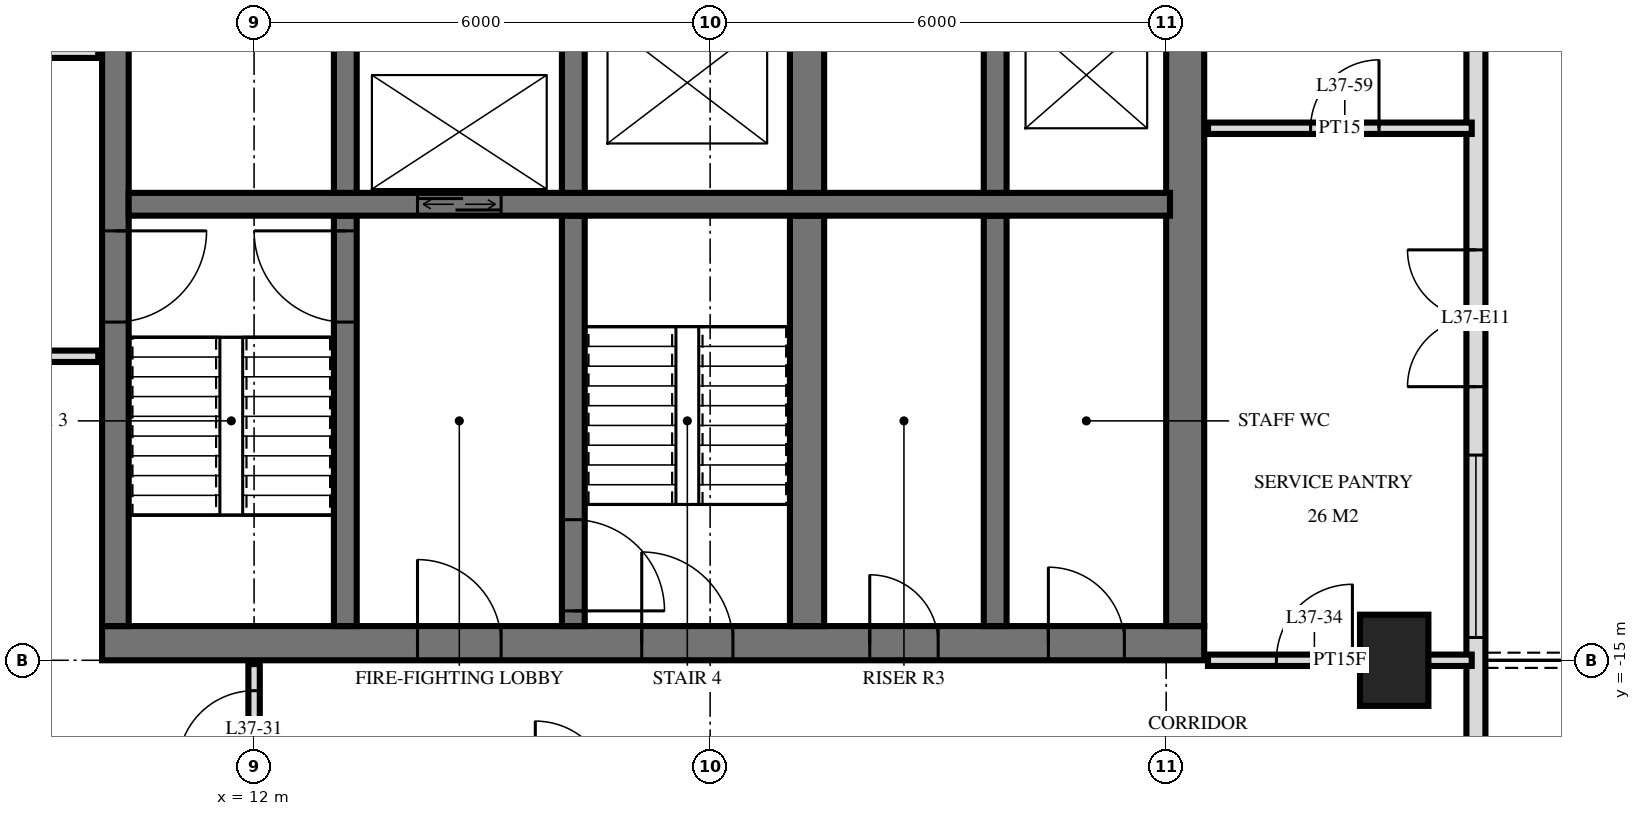
"""IFC4 building model, lengths in metres.
Left out: names, types, materials, properties, quantities, classifications, styles, units other than length and angle.
Written with IfcOpenShell. Run it as: python <this file> out.ifc"""

import sys

from ifc_helpers import new_model, si_unit, direction, frame, frame_2d, origin, origin_2d, place, context, subcontext, project, spatial, rectangle, extrude, element, fill, save


model = new_model("IFC4")
c1 = context("Model", 3, precision=1e-05, world=origin(), true_north=direction((0.0, 1.0)))
c2 = subcontext(c1, "Body", "Model", "MODEL_VIEW")
j1 = project(units=[si_unit("LENGTHUNIT", "METRE"), si_unit("PLANEANGLEUNIT", "RADIAN")], contexts=[c1])
p1 = place(None, origin())
s1 = spatial("IfcSite", under=j1, at=p1, CompositionType="ELEMENT")
p2 = place(p1, origin())
s2 = spatial("IfcBuilding", under=s1, at=p2, CompositionType="ELEMENT")
p3 = place(p2, frame((0.0, 0.0, 145.2)))
s3 = spatial("IfcBuildingStorey", under=s2, at=p3, CompositionType="ELEMENT", Elevation=145.2)
p4 = place(p3, frame((27.0, -15.0, 0.0), z_axis=(0.0, 0.0, 1.0), x_axis=(0.0, 1.0, 0.0)))
e1 = element("IfcColumn", 1, at=p4, inside=s3, PredefinedType="COLUMN", context=c2, shape_type="SweptSolid", body=[
    extrude(rectangle(XDim=1.2, YDim=0.9, at=origin_2d()), origin(), (0.0, 0.0, 1.0), 3.6),
])
p5 = place(p3, frame((10.0, -14.775, 0.0), z_axis=(0.0, 0.0, 1.0), x_axis=(1.0, 0.0, 0.0)))
e2 = element("IfcWall", 2, at=p5, inside=s3, PredefinedType="SHEAR", context=c2, shape_type="SweptSolid", body=[
    extrude(rectangle(XDim=14.5, YDim=0.45, at=frame_2d((7.25, 0.0))), origin(), (0.0, 0.0, 1.0), 3.6),
])
p6 = place(p5, frame((7.1, 0.0, 0.0)))
e3 = element("IfcOpeningElement", 3, at=p6, cuts=e2, PredefinedType="OPENING", context=c2, shape_type="SweptSolid", body=[
    extrude(rectangle(XDim=1.2, YDim=2.1, at=frame_2d((0.6, 1.05))), frame((0.0, 0.235, 0.0), z_axis=(0.0, -1.0, 0.0), x_axis=(1.0, 0.0, 0.0)), (0.0, 0.0, 1.0), 0.47),
])
p7 = place(p5, frame((4.15, 0.0, 0.0)))
e4 = element("IfcOpeningElement", 4, at=p7, cuts=e2, PredefinedType="OPENING", context=c2, shape_type="SweptSolid", body=[
    extrude(rectangle(XDim=1.1, YDim=2.1, at=frame_2d((0.55, 1.05))), frame((0.0, 0.235, 0.0), z_axis=(0.0, -1.0, 0.0), x_axis=(1.0, 0.0, 0.0)), (0.0, 0.0, 1.0), 0.47),
])
p8 = place(p5, frame((10.1, 0.0, 0.0)))
e5 = element("IfcOpeningElement", 5, at=p8, cuts=e2, PredefinedType="OPENING", context=c2, shape_type="SweptSolid", body=[
    extrude(rectangle(XDim=0.9, YDim=2.1, at=frame_2d((0.45, 1.05))), frame((0.0, 0.235, 0.0), z_axis=(0.0, -1.0, 0.0), x_axis=(1.0, 0.0, 0.0)), (0.0, 0.0, 1.0), 0.47),
])
p9 = place(p5, frame((12.45, 0.0, 0.0)))
e6 = element("IfcOpeningElement", 6, at=p9, cuts=e2, PredefinedType="OPENING", context=c2, shape_type="SweptSolid", body=[
    extrude(rectangle(XDim=1.0, YDim=2.1, at=frame_2d((0.5, 1.05))), frame((0.0, 0.235, 0.0), z_axis=(0.0, -1.0, 0.0), x_axis=(1.0, 0.0, 0.0)), (0.0, 0.0, 1.0), 0.47),
])
p10 = place(p3, frame((10.175, -14.55, 0.0), z_axis=(0.0, 0.0, 1.0), x_axis=(0.0, 1.0, 0.0)))
e7 = element("IfcWall", 7, at=p10, inside=s3, PredefinedType="SHEAR", context=c2, shape_type="SweptSolid", body=[
    extrude(rectangle(XDim=14.1, YDim=0.35, at=frame_2d((7.05, 0.0))), origin(), (0.0, 0.0, 1.0), 3.6),
])
p11 = place(p10, frame((8.4, 0.0, 0.0)))
e8 = element("IfcOpeningElement", 8, at=p11, cuts=e7, PredefinedType="OPENING", context=c2, shape_type="SweptSolid", body=[
    extrude(rectangle(XDim=1.4, YDim=2.4, at=frame_2d((0.7, 1.2))), frame((0.0, 0.185, 0.0), z_axis=(0.0, -1.0, 0.0), x_axis=(1.0, 0.0, 0.0)), (0.0, 0.0, 1.0), 0.37),
])
p12 = place(p10, frame((10.0, 0.0, 0.0)))
e9 = element("IfcOpeningElement", 9, at=p12, cuts=e7, PredefinedType="OPENING", context=c2, shape_type="SweptSolid", body=[
    extrude(rectangle(XDim=1.4, YDim=2.4, at=frame_2d((0.7, 1.2))), frame((0.0, 0.185, 0.0), z_axis=(0.0, -1.0, 0.0), x_axis=(1.0, 0.0, 0.0)), (0.0, 0.0, 1.0), 0.37),
])
p13 = place(p10, frame((4.0, 0.0, 0.0)))
e10 = element("IfcOpeningElement", 10, at=p13, cuts=e7, PredefinedType="OPENING", context=c2, shape_type="SweptSolid", body=[
    extrude(rectangle(XDim=1.2, YDim=2.1, at=frame_2d((0.6, 1.05))), frame((0.0, 0.185, 0.0), z_axis=(0.0, -1.0, 0.0), x_axis=(1.0, 0.0, 0.0)), (0.0, 0.0, 1.0), 0.37),
])
p14 = place(p3, frame((24.25, -14.55, 0.0), z_axis=(0.0, 0.0, 1.0), x_axis=(0.0, 1.0, 0.0)))
e11 = element("IfcWall", 11, at=p14, inside=s3, PredefinedType="SHEAR", context=c2, shape_type="SweptSolid", body=[
    extrude(rectangle(XDim=14.1, YDim=0.5, at=frame_2d((7.05, 0.0))), origin(), (0.0, 0.0, 1.0), 3.6),
])
p15 = place(p3, frame((10.35, -9.0, 0.0), z_axis=(0.0, 0.0, 1.0), x_axis=(1.0, 0.0, 0.0)))
e12 = element("IfcWall", 12, at=p15, inside=s3, PredefinedType="SHEAR", context=c2, shape_type="SweptSolid", body=[
    extrude(rectangle(XDim=13.7, YDim=0.3, at=frame_2d((6.85, 0.0))), origin(), (0.0, 0.0, 1.0), 3.6),
])
p16 = place(p15, frame((3.8, 0.0, 0.0)))
e13 = element("IfcOpeningElement", 13, at=p16, cuts=e12, PredefinedType="OPENING", context=c2, shape_type="SweptSolid", body=[
    extrude(rectangle(XDim=1.1, YDim=2.1, at=frame_2d((0.55, 1.05))), frame((0.0, 0.16, 0.0), z_axis=(0.0, -1.0, 0.0), x_axis=(1.0, 0.0, 0.0)), (0.0, 0.0, 1.0), 0.32),
])
p17 = place(p3, frame((13.2, -8.85, 0.0), z_axis=(0.0, 0.0, 1.0), x_axis=(0.0, 1.0, 0.0)))
e14 = element("IfcWall", 14, at=p17, inside=s3, PredefinedType="SHEAR", context=c2, shape_type="SweptSolid", body=[
    extrude(rectangle(XDim=2.3, YDim=0.3, at=frame_2d((1.15, 0.0))), origin(), (0.0, 0.0, 1.0), 3.6),
])
p18 = place(p3, frame((13.2, -14.55, 0.0), z_axis=(0.0, 0.0, 1.0), x_axis=(0.0, 1.0, 0.0)))
e15 = element("IfcWall", 15, at=p18, inside=s3, PredefinedType="SHEAR", context=c2, shape_type="SweptSolid", body=[
    extrude(rectangle(XDim=5.4, YDim=0.3, at=frame_2d((2.7, 0.0))), origin(), (0.0, 0.0, 1.0), 3.6),
])
p19 = place(p18, frame((4.0, 0.0, 0.0)))
e16 = element("IfcOpeningElement", 16, at=p19, cuts=e15, PredefinedType="OPENING", context=c2, shape_type="SweptSolid", body=[
    extrude(rectangle(XDim=1.2, YDim=2.1, at=frame_2d((0.6, 1.05))), frame((0.0, 0.16, 0.0), z_axis=(0.0, -1.0, 0.0), x_axis=(1.0, 0.0, 0.0)), (0.0, 0.0, 1.0), 0.32),
])
p20 = place(p3, frame((16.2, -8.85, 0.0), z_axis=(0.0, 0.0, 1.0), x_axis=(0.0, 1.0, 0.0)))
e17 = element("IfcWall", 17, at=p20, inside=s3, PredefinedType="SHEAR", context=c2, shape_type="SweptSolid", body=[
    extrude(rectangle(XDim=2.3, YDim=0.3, at=frame_2d((1.15, 0.0))), origin(), (0.0, 0.0, 1.0), 3.6),
])
p21 = place(p3, frame((16.2, -14.55, 0.0), z_axis=(0.0, 0.0, 1.0), x_axis=(0.0, 1.0, 0.0)))
e18 = element("IfcWall", 18, at=p21, inside=s3, PredefinedType="SHEAR", context=c2, shape_type="SweptSolid", body=[
    extrude(rectangle(XDim=5.4, YDim=0.3, at=frame_2d((2.7, 0.0))), origin(), (0.0, 0.0, 1.0), 3.6),
])
p22 = place(p21, frame((0.2, 0.0, 0.0)))
e19 = element("IfcOpeningElement", 19, at=p22, cuts=e18, PredefinedType="OPENING", context=c2, shape_type="SweptSolid", body=[
    extrude(rectangle(XDim=1.2, YDim=2.1, at=frame_2d((0.6, 1.05))), frame((0.0, 0.16, 0.0), z_axis=(0.0, -1.0, 0.0), x_axis=(1.0, 0.0, 0.0)), (0.0, 0.0, 1.0), 0.32),
])
p23 = place(p3, frame((19.275, -8.85, 0.0), z_axis=(0.0, 0.0, 1.0), x_axis=(0.0, 1.0, 0.0)))
e20 = element("IfcWall", 20, at=p23, inside=s3, PredefinedType="SHEAR", context=c2, shape_type="SweptSolid", body=[
    extrude(rectangle(XDim=2.3, YDim=0.45, at=frame_2d((1.15, 0.0))), origin(), (0.0, 0.0, 1.0), 3.6),
])
p24 = place(p3, frame((19.275, -14.55, 0.0), z_axis=(0.0, 0.0, 1.0), x_axis=(0.0, 1.0, 0.0)))
e21 = element("IfcWall", 21, at=p24, inside=s3, PredefinedType="SHEAR", context=c2, shape_type="SweptSolid", body=[
    extrude(rectangle(XDim=5.4, YDim=0.45, at=frame_2d((2.7, 0.0))), origin(), (0.0, 0.0, 1.0), 3.6),
])
p25 = place(p3, frame((21.75, -8.85, 0.0), z_axis=(0.0, 0.0, 1.0), x_axis=(0.0, 1.0, 0.0)))
e22 = element("IfcWall", 22, at=p25, inside=s3, PredefinedType="SHEAR", context=c2, shape_type="SweptSolid", body=[
    extrude(rectangle(XDim=2.3, YDim=0.3, at=frame_2d((1.15, 0.0))), origin(), (0.0, 0.0, 1.0), 3.6),
])
p26 = place(p3, frame((21.75, -14.55, 0.0), z_axis=(0.0, 0.0, 1.0), x_axis=(0.0, 1.0, 0.0)))
e23 = element("IfcWall", 23, at=p26, inside=s3, PredefinedType="SHEAR", context=c2, shape_type="SweptSolid", body=[
    extrude(rectangle(XDim=5.4, YDim=0.3, at=frame_2d((2.7, 0.0))), origin(), (0.0, 0.0, 1.0), 3.6),
])
p27 = place(p3, frame((28.075, -29.275, 0.0), z_axis=(0.0, 0.0, 1.0), x_axis=(0.0, 1.0, 0.0)))
e24 = element("IfcWall", 24, at=p27, inside=s3, PredefinedType="SOLIDWALL", context=c2, shape_type="SweptSolid", body=[
    extrude(rectangle(XDim=25.951, YDim=0.25, at=frame_2d((12.975, 0.0))), origin(), (0.0, 0.0, 1.0), 3.32),
])
p28 = place(p27, frame((0.575, 0.0, 0.0)))
e25 = element("IfcOpeningElement", 25, at=p28, cuts=e24, PredefinedType="OPENING", context=c2, shape_type="SweptSolid", body=[
    extrude(rectangle(XDim=1.8, YDim=2.4, at=frame_2d((0.9, 1.2))), frame((0.0, 0.135, 0.0), z_axis=(0.0, -1.0, 0.0), x_axis=(1.0, 0.0, 0.0)), (0.0, 0.0, 1.0), 0.27),
])
p29 = place(p27, frame((3.325, 0.0, 0.3)))
e26 = element("IfcOpeningElement", 26, at=p29, cuts=e24, PredefinedType="OPENING", context=c2, shape_type="SweptSolid", body=[
    extrude(rectangle(XDim=1.8, YDim=2.1, at=frame_2d((0.9, 1.05))), frame((0.0, 0.135, 0.0), z_axis=(0.0, -1.0, 0.0), x_axis=(1.0, 0.0, 0.0)), (0.0, 0.0, 1.0), 0.27),
])
p30 = place(p27, frame((9.475, 0.0, 0.0)))
e27 = element("IfcOpeningElement", 27, at=p30, cuts=e24, PredefinedType="OPENING", context=c2, shape_type="SweptSolid", body=[
    extrude(rectangle(XDim=1.8, YDim=2.4, at=frame_2d((0.9, 1.2))), frame((0.0, 0.135, 0.0), z_axis=(0.0, -1.0, 0.0), x_axis=(1.0, 0.0, 0.0)), (0.0, 0.0, 1.0), 0.27),
])
p31 = place(p27, frame((14.575, 0.0, 0.3)))
e28 = element("IfcOpeningElement", 28, at=p31, cuts=e24, PredefinedType="OPENING", context=c2, shape_type="SweptSolid", body=[
    extrude(rectangle(XDim=2.4, YDim=2.1, at=frame_2d((1.2, 1.05))), frame((0.0, 0.135, 0.0), z_axis=(0.0, -1.0, 0.0), x_axis=(1.0, 0.0, 0.0)), (0.0, 0.0, 1.0), 0.27),
])
p32 = place(p27, frame((17.875, 0.0, 0.0)))
e29 = element("IfcOpeningElement", 29, at=p32, cuts=e24, PredefinedType="OPENING", context=c2, shape_type="SweptSolid", body=[
    extrude(rectangle(XDim=1.8, YDim=2.4, at=frame_2d((0.9, 1.2))), frame((0.0, 0.135, 0.0), z_axis=(0.0, -1.0, 0.0), x_axis=(1.0, 0.0, 0.0)), (0.0, 0.0, 1.0), 0.27),
])
p33 = place(p3, frame((12.0, -16.8, 0.0), z_axis=(0.0, 0.0, 1.0), x_axis=(0.0, 1.0, 0.0)))
e30 = element("IfcWall", 30, at=p33, inside=s3, PredefinedType="PARTITIONING", context=c2, shape_type="SweptSolid", body=[
    extrude(rectangle(XDim=1.75, YDim=0.15, at=frame_2d((0.875, 0.0))), origin(), (0.0, 0.0, 1.0), 3.32),
])
p34 = place(p33, frame((0.4, 0.0, 0.0)))
e31 = element("IfcOpeningElement", 31, at=p34, cuts=e30, PredefinedType="OPENING", context=c2, shape_type="SweptSolid", body=[
    extrude(rectangle(XDim=1.0, YDim=2.1, at=frame_2d((0.5, 1.05))), frame((0.0, 0.085, 0.0), z_axis=(0.0, -1.0, 0.0), x_axis=(1.0, 0.0, 0.0)), (0.0, 0.0, 1.0), 0.17),
])
p35 = place(p3, frame((24.55, -15.0, 0.0), z_axis=(0.0, 0.0, 1.0), x_axis=(1.0, 0.0, 0.0)))
e32 = element("IfcWall", 32, at=p35, inside=s3, PredefinedType="PARTITIONING", context=c2, shape_type="SweptSolid", body=[
    extrude(rectangle(XDim=3.47, YDim=0.15, at=frame_2d((1.735, 0.0))), origin(), (0.0, 0.0, 1.0), 3.32),
])
p36 = place(p35, frame((0.9, 0.0, 0.0)))
e33 = element("IfcOpeningElement", 33, at=p36, cuts=e32, PredefinedType="OPENING", context=c2, shape_type="SweptSolid", body=[
    extrude(rectangle(XDim=1.0, YDim=2.1, at=frame_2d((0.5, 1.05))), frame((0.0, 0.085, 0.0), z_axis=(0.0, -1.0, 0.0), x_axis=(1.0, 0.0, 0.0)), (0.0, 0.0, 1.0), 0.17),
])
p37 = place(p3, frame((-9.95, -11.0, 0.0), z_axis=(0.0, 0.0, 1.0), x_axis=(1.0, 0.0, 0.0)))
e34 = element("IfcWall", 34, at=p37, inside=s3, PredefinedType="PARTITIONING", context=c2, shape_type="SweptSolid", body=[
    extrude(rectangle(XDim=19.9, YDim=0.15, at=frame_2d((9.95, 0.0))), origin(), (0.0, 0.0, 1.0), 3.32),
])
p38 = place(p37, frame((9.45, 0.0, 0.0)))
e35 = element("IfcOpeningElement", 35, at=p38, cuts=e34, PredefinedType="OPENING", context=c2, shape_type="SweptSolid", body=[
    extrude(rectangle(XDim=1.0, YDim=2.1, at=frame_2d((0.5, 1.05))), frame((0.0, 0.085, 0.0), z_axis=(0.0, -1.0, 0.0), x_axis=(1.0, 0.0, 0.0)), (0.0, 0.0, 1.0), 0.17),
])
p39 = place(p37, frame((3.45, 0.0, 0.0)))
e36 = element("IfcOpeningElement", 36, at=p39, cuts=e34, PredefinedType="OPENING", context=c2, shape_type="SweptSolid", body=[
    extrude(rectangle(XDim=1.0, YDim=2.1, at=frame_2d((0.5, 1.05))), frame((0.0, 0.085, 0.0), z_axis=(0.0, -1.0, 0.0), x_axis=(1.0, 0.0, 0.0)), (0.0, 0.0, 1.0), 0.17),
])
p40 = place(p3, frame((24.55, -8.0, 0.0), z_axis=(0.0, 0.0, 1.0), x_axis=(1.0, 0.0, 0.0)))
e37 = element("IfcWall", 37, at=p40, inside=s3, PredefinedType="PARTITIONING", context=c2, shape_type="SweptSolid", body=[
    extrude(rectangle(XDim=3.47, YDim=0.15, at=frame_2d((1.735, 0.0))), origin(), (0.0, 0.0, 1.0), 3.32),
])
p41 = place(p40, frame((1.35, 0.0, 0.0)))
e38 = element("IfcOpeningElement", 38, at=p41, cuts=e37, PredefinedType="OPENING", context=c2, shape_type="SweptSolid", body=[
    extrude(rectangle(XDim=0.9, YDim=2.1, at=frame_2d((0.45, 1.05))), frame((0.0, 0.085, 0.0), z_axis=(0.0, -1.0, 0.0), x_axis=(1.0, 0.0, 0.0)), (0.0, 0.0, 1.0), 0.17),
])
p42 = place(p3, frame((-9.95, -7.0, 0.0), z_axis=(0.0, 0.0, 1.0), x_axis=(1.0, 0.0, 0.0)))
e39 = element("IfcWall", 39, at=p42, inside=s3, PredefinedType="PARTITIONING", context=c2, shape_type="SweptSolid", body=[
    extrude(rectangle(XDim=19.9, YDim=0.15, at=frame_2d((9.95, 0.0))), origin(), (0.0, 0.0, 1.0), 3.32),
])
p43 = place(p42, frame((9.45, 0.0, 0.0)))
e40 = element("IfcOpeningElement", 40, at=p43, cuts=e39, PredefinedType="OPENING", context=c2, shape_type="SweptSolid", body=[
    extrude(rectangle(XDim=1.0, YDim=2.1, at=frame_2d((0.5, 1.05))), frame((0.0, 0.085, 0.0), z_axis=(0.0, -1.0, 0.0), x_axis=(1.0, 0.0, 0.0)), (0.0, 0.0, 1.0), 0.17),
])
p44 = place(p42, frame((15.45, 0.0, 0.0)))
e41 = element("IfcOpeningElement", 41, at=p44, cuts=e39, PredefinedType="OPENING", context=c2, shape_type="SweptSolid", body=[
    extrude(rectangle(XDim=1.0, YDim=2.1, at=frame_2d((0.5, 1.05))), frame((0.0, 0.085, 0.0), z_axis=(0.0, -1.0, 0.0), x_axis=(1.0, 0.0, 0.0)), (0.0, 0.0, 1.0), 0.17),
])
p45 = place(p31, origin())
e42 = element("IfcWindow", 42, at=p45, inside=s3, PartitioningType="SINGLE_PANEL", PredefinedType="WINDOW", context=c2, shape_type="SweptSolid", body=[
    extrude(rectangle(XDim=2.4, YDim=2.1, at=frame_2d((1.2, 1.05))), frame((0.0, 0.03, 0.0), z_axis=(0.0, -1.0, 0.0), x_axis=(1.0, 0.0, 0.0)), (0.0, 0.0, 1.0), 0.06),
])
fill(e28, e42)
p46 = place(p32, origin())
e43 = element("IfcDoor", 43, at=p46, inside=s3, OperationType="DOUBLE_DOOR_SINGLE_SWING", PredefinedType="DOOR", context=c2, shape_type="SweptSolid", body=[
    extrude(rectangle(XDim=1.8, YDim=2.4, at=frame_2d((0.9, 1.2))), frame((0.0, 0.025, 0.0), z_axis=(0.0, -1.0, 0.0), x_axis=(1.0, 0.0, 0.0)), (0.0, 0.0, 1.0), 0.05),
])
fill(e29, e43)
p47 = place(p16, origin())
e44 = element("IfcDoor", 44, at=p47, inside=s3, OperationType="DOUBLE_DOOR_SLIDING", PredefinedType="USERDEFINED", context=c2, shape_type="SweptSolid", body=[
    extrude(rectangle(XDim=1.1, YDim=2.1, at=frame_2d((0.55, 1.05))), frame((0.0, 0.025, 0.0), z_axis=(0.0, -1.0, 0.0), x_axis=(1.0, 0.0, 0.0)), (0.0, 0.0, 1.0), 0.05),
])
fill(e13, e44)
p48 = place(p13, frame((0.6, 0.0, 0.0), z_axis=(0.0, 0.0, 1.0), x_axis=(-1.0, 0.0, 0.0)))
e45 = element("IfcDoor", 45, at=p48, inside=s3, OperationType="SINGLE_SWING_RIGHT", PredefinedType="DOOR", context=c2, shape_type="SweptSolid", body=[
    extrude(rectangle(XDim=1.2, YDim=2.1, at=frame_2d((0.0, 1.05))), frame((0.0, -0.025, 0.0), z_axis=(0.0, 1.0, 0.0), x_axis=(-1.0, 0.0, 0.0)), (0.0, 0.0, 1.0), 0.05),
])
fill(e10, e45)
p49 = place(p6, origin())
e46 = element("IfcDoor", 46, at=p49, inside=s3, OperationType="SINGLE_SWING_RIGHT", PredefinedType="DOOR", context=c2, shape_type="SweptSolid", body=[
    extrude(rectangle(XDim=1.2, YDim=2.1, at=frame_2d((0.6, 1.05))), frame((0.0, 0.025, 0.0), z_axis=(0.0, -1.0, 0.0), x_axis=(1.0, 0.0, 0.0)), (0.0, 0.0, 1.0), 0.05),
])
fill(e3, e46)
p50 = place(p7, origin())
e47 = element("IfcDoor", 47, at=p50, inside=s3, OperationType="SINGLE_SWING_RIGHT", PredefinedType="DOOR", context=c2, shape_type="SweptSolid", body=[
    extrude(rectangle(XDim=1.1, YDim=2.1, at=frame_2d((0.55, 1.05))), frame((0.0, 0.025, 0.0), z_axis=(0.0, -1.0, 0.0), x_axis=(1.0, 0.0, 0.0)), (0.0, 0.0, 1.0), 0.05),
])
fill(e4, e47)
p51 = place(p8, origin())
e48 = element("IfcDoor", 48, at=p51, inside=s3, OperationType="SINGLE_SWING_RIGHT", PredefinedType="DOOR", context=c2, shape_type="SweptSolid", body=[
    extrude(rectangle(XDim=0.9, YDim=2.1, at=frame_2d((0.45, 1.05))), frame((0.0, 0.025, 0.0), z_axis=(0.0, -1.0, 0.0), x_axis=(1.0, 0.0, 0.0)), (0.0, 0.0, 1.0), 0.05),
])
fill(e5, e48)
p52 = place(p9, origin())
e49 = element("IfcDoor", 49, at=p52, inside=s3, OperationType="SINGLE_SWING_RIGHT", PredefinedType="DOOR", context=c2, shape_type="SweptSolid", body=[
    extrude(rectangle(XDim=1.0, YDim=2.1, at=frame_2d((0.5, 1.05))), frame((0.0, 0.025, 0.0), z_axis=(0.0, -1.0, 0.0), x_axis=(1.0, 0.0, 0.0)), (0.0, 0.0, 1.0), 0.05),
])
fill(e6, e49)
p53 = place(p19, origin())
e50 = element("IfcDoor", 50, at=p53, inside=s3, OperationType="SINGLE_SWING_LEFT", PredefinedType="DOOR", context=c2, shape_type="SweptSolid", body=[
    extrude(rectangle(XDim=1.2, YDim=2.1, at=frame_2d((0.6, 1.05))), frame((0.0, 0.025, 0.0), z_axis=(0.0, -1.0, 0.0), x_axis=(1.0, 0.0, 0.0)), (0.0, 0.0, 1.0), 0.05),
])
fill(e16, e50)
p54 = place(p22, frame((0.6, 0.0, 0.0), z_axis=(0.0, 0.0, 1.0), x_axis=(-1.0, 0.0, 0.0)))
e51 = element("IfcDoor", 51, at=p54, inside=s3, OperationType="SINGLE_SWING_LEFT", PredefinedType="DOOR", context=c2, shape_type="SweptSolid", body=[
    extrude(rectangle(XDim=1.2, YDim=2.1, at=frame_2d((0.0, 1.05))), frame((0.0, -0.025, 0.0), z_axis=(0.0, 1.0, 0.0), x_axis=(-1.0, 0.0, 0.0)), (0.0, 0.0, 1.0), 0.05),
])
fill(e19, e51)
p55 = place(p34, origin())
e52 = element("IfcDoor", 52, at=p55, inside=s3, OperationType="SINGLE_SWING_RIGHT", PredefinedType="DOOR", context=c2, shape_type="SweptSolid", body=[
    extrude(rectangle(XDim=1.0, YDim=2.1, at=frame_2d((0.5, 1.05))), frame((0.0, 0.025, 0.0), z_axis=(0.0, -1.0, 0.0), x_axis=(1.0, 0.0, 0.0)), (0.0, 0.0, 1.0), 0.05),
])
fill(e31, e52)
p56 = place(p36, origin())
e53 = element("IfcDoor", 53, at=p56, inside=s3, OperationType="SINGLE_SWING_LEFT", PredefinedType="DOOR", context=c2, shape_type="SweptSolid", body=[
    extrude(rectangle(XDim=1.0, YDim=2.1, at=frame_2d((0.5, 1.05))), frame((0.0, 0.025, 0.0), z_axis=(0.0, -1.0, 0.0), x_axis=(1.0, 0.0, 0.0)), (0.0, 0.0, 1.0), 0.05),
])
fill(e33, e53)
p57 = place(p41, origin())
e54 = element("IfcDoor", 54, at=p57, inside=s3, OperationType="SINGLE_SWING_LEFT", PredefinedType="DOOR", context=c2, shape_type="SweptSolid", body=[
    extrude(rectangle(XDim=0.9, YDim=2.1, at=frame_2d((0.45, 1.05))), frame((0.0, 0.025, 0.0), z_axis=(0.0, -1.0, 0.0), x_axis=(1.0, 0.0, 0.0)), (0.0, 0.0, 1.0), 0.05),
])
fill(e38, e54)
save(model, sys.argv[1])
